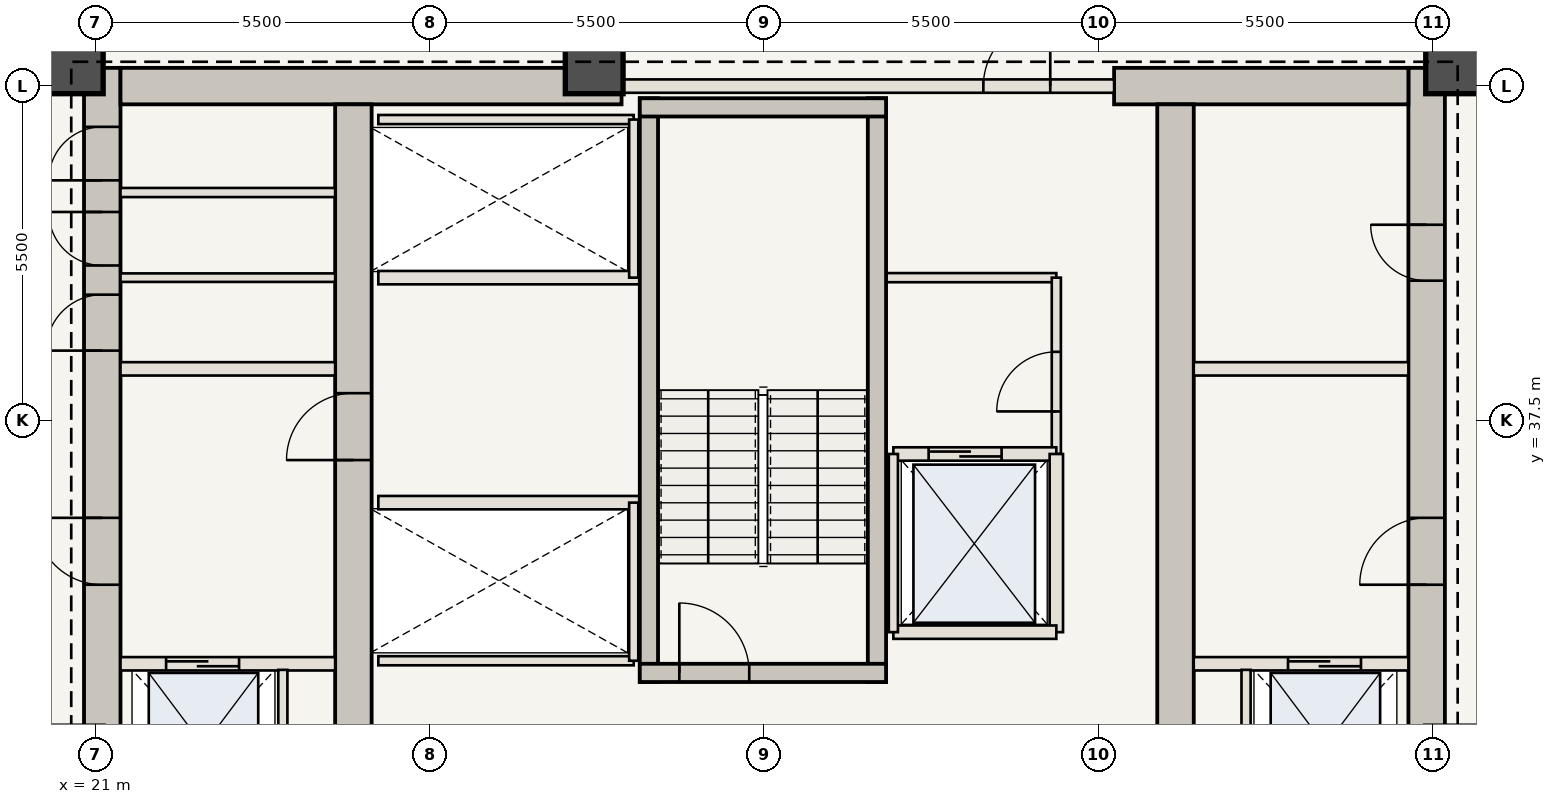
"""IFC4 building model, lengths in metres.
Left out: names, types, materials, properties, quantities, classifications, styles, units other than length and angle.
Written with IfcOpenShell. Run it as: python <this file> out.ifc"""

import sys

from ifc_helpers import new_model, si_unit, direction, frame, frame_2d, origin, origin_2d, place, context, subcontext, project, spatial, rectangle, extrude, element, fill, save


model = new_model("IFC4")
c1 = context("Model", 3, precision=1e-05, world=origin(), true_north=direction((0.0, 1.0)))
c2 = subcontext(c1, "Body", "Model", "MODEL_VIEW")
j1 = project(units=[si_unit("LENGTHUNIT", "METRE"), si_unit("PLANEANGLEUNIT", "RADIAN")], contexts=[c1])
p1 = place(None, origin())
s1 = spatial("IfcSite", under=j1, at=p1, CompositionType="ELEMENT")
p2 = place(p1, origin())
s2 = spatial("IfcBuilding", under=s1, at=p2, CompositionType="ELEMENT")
p3 = place(p2, frame((0.0, 0.0, 122.15)))
s3 = spatial("IfcBuildingStorey", under=s2, at=p3, CompositionType="ELEMENT", Elevation=122.15)
p4 = place(p3, frame((21.11, 30.6, 0.0), z_axis=(0.0, 0.0, 1.0), x_axis=(0.0, 1.0, 0.0)))
e1 = element("IfcWall", 1, at=p4, inside=s3, PredefinedType="SHEAR", context=c2, shape_type="SweptSolid", body=[
    extrude(rectangle(XDim=12.7, YDim=0.6, at=frame_2d((6.35, 0.0))), origin(), (0.0, 0.0, 1.0), 3.85),
])
p5 = place(p4, frame((4.2, 0.0, 0.0)))
e2 = element("IfcOpeningElement", 2, at=p5, cuts=e1, PredefinedType="OPENING", context=c2, shape_type="SweptSolid", body=[
    extrude(rectangle(XDim=1.1, YDim=2.15, at=frame_2d((0.55, 1.075))), frame((0.0, 0.31, 0.0), z_axis=(0.0, -1.0, 0.0), x_axis=(1.0, 0.0, 0.0)), (0.0, 0.0, 1.0), 0.62),
])
p6 = place(p4, frame((8.05, 0.0, 0.0)))
e3 = element("IfcOpeningElement", 3, at=p6, cuts=e1, PredefinedType="OPENING", context=c2, shape_type="SweptSolid", body=[
    extrude(rectangle(XDim=0.92, YDim=2.1, at=frame_2d((0.46, 1.05))), frame((0.0, 0.31, 0.0), z_axis=(0.0, -1.0, 0.0), x_axis=(1.0, 0.0, 0.0)), (0.0, 0.0, 1.0), 0.62),
])
p7 = place(p4, frame((9.45, 0.0, 0.0)))
e4 = element("IfcOpeningElement", 4, at=p7, cuts=e1, PredefinedType="OPENING", context=c2, shape_type="SweptSolid", body=[
    extrude(rectangle(XDim=0.88, YDim=2.1, at=frame_2d((0.44, 1.05))), frame((0.0, 0.31, 0.0), z_axis=(0.0, -1.0, 0.0), x_axis=(1.0, 0.0, 0.0)), (0.0, 0.0, 1.0), 0.62),
])
p8 = place(p4, frame((10.85, 0.0, 0.0)))
e5 = element("IfcOpeningElement", 5, at=p8, cuts=e1, PredefinedType="OPENING", context=c2, shape_type="SweptSolid", body=[
    extrude(rectangle(XDim=0.88, YDim=2.1, at=frame_2d((0.44, 1.05))), frame((0.0, 0.31, 0.0), z_axis=(0.0, -1.0, 0.0), x_axis=(1.0, 0.0, 0.0)), (0.0, 0.0, 1.0), 0.62),
])
p9 = place(p3, frame((42.89, 30.6, 0.0), z_axis=(0.0, 0.0, 1.0), x_axis=(0.0, 1.0, 0.0)))
e6 = element("IfcWall", 6, at=p9, inside=s3, PredefinedType="SHEAR", context=c2, shape_type="SweptSolid", body=[
    extrude(rectangle(XDim=12.7, YDim=0.6, at=frame_2d((6.35, 0.0))), origin(), (0.0, 0.0, 1.0), 3.85),
])
p10 = place(p9, frame((4.2, 0.0, 0.0)))
e7 = element("IfcOpeningElement", 7, at=p10, cuts=e6, PredefinedType="OPENING", context=c2, shape_type="SweptSolid", body=[
    extrude(rectangle(XDim=1.1, YDim=2.15, at=frame_2d((0.55, 1.075))), frame((0.0, 0.31, 0.0), z_axis=(0.0, -1.0, 0.0), x_axis=(1.0, 0.0, 0.0)), (0.0, 0.0, 1.0), 0.62),
])
p11 = place(p9, frame((9.2, 0.0, 0.0)))
e8 = element("IfcOpeningElement", 8, at=p11, cuts=e6, PredefinedType="OPENING", context=c2, shape_type="SweptSolid", body=[
    extrude(rectangle(XDim=0.92, YDim=2.1, at=frame_2d((0.46, 1.05))), frame((0.0, 0.31, 0.0), z_axis=(0.0, -1.0, 0.0), x_axis=(1.0, 0.0, 0.0)), (0.0, 0.0, 1.0), 0.62),
])
p12 = place(p3, frame((21.41, 43.0, 0.0), z_axis=(0.0, 0.0, 1.0), x_axis=(1.0, 0.0, 0.0)))
e9 = element("IfcWall", 9, at=p12, inside=s3, PredefinedType="SHEAR", context=c2, shape_type="SweptSolid", body=[
    extrude(rectangle(XDim=8.24, YDim=0.6, at=frame_2d((4.12, 0.0))), origin(), (0.0, 0.0, 1.0), 3.85),
])
p13 = place(p3, frame((37.75, 43.0, 0.0), z_axis=(0.0, 0.0, 1.0), x_axis=(1.0, 0.0, 0.0)))
e10 = element("IfcWall", 10, at=p13, inside=s3, PredefinedType="SHEAR", context=c2, shape_type="SweptSolid", body=[
    extrude(rectangle(XDim=4.84, YDim=0.6, at=frame_2d((2.42, 0.0))), origin(), (0.0, 0.0, 1.0), 3.85),
])
p14 = place(p3, frame((25.24, 30.6, 0.0), z_axis=(0.0, 0.0, 1.0), x_axis=(0.0, 1.0, 0.0)))
e11 = element("IfcWall", 11, at=p14, inside=s3, PredefinedType="SHEAR", context=c2, shape_type="SweptSolid", body=[
    extrude(rectangle(XDim=12.1, YDim=0.6, at=frame_2d((6.05, 0.0))), origin(), (0.0, 0.0, 1.0), 3.85),
])
p15 = place(p14, frame((6.25, 0.0, 0.0)))
e12 = element("IfcOpeningElement", 12, at=p15, cuts=e11, PredefinedType="OPENING", context=c2, shape_type="SweptSolid", body=[
    extrude(rectangle(XDim=1.1, YDim=2.15, at=frame_2d((0.55, 1.075))), frame((0.0, 0.31, 0.0), z_axis=(0.0, -1.0, 0.0), x_axis=(1.0, 0.0, 0.0)), (0.0, 0.0, 1.0), 0.62),
])
p16 = place(p3, frame((38.76, 30.6, 0.0), z_axis=(0.0, 0.0, 1.0), x_axis=(0.0, 1.0, 0.0)))
e13 = element("IfcWall", 13, at=p16, inside=s3, PredefinedType="SHEAR", context=c2, shape_type="SweptSolid", body=[
    extrude(rectangle(XDim=12.1, YDim=0.6, at=frame_2d((6.05, 0.0))), origin(), (0.0, 0.0, 1.0), 3.85),
])
for number, where, z_axis, x_axis in (
    (14, (43.35, 43.35, 0.0), (0.0, 0.0, 1.0), (1.0, 0.0, 0.0)),
    (15, (29.2, 43.35, 0.0), (0.0, 0.0, 1.0), (1.0, 0.0, 0.0)),
    (16, (20.65, 43.35, 0.0), (0.0, 0.0, 1.0), (1.0, 0.0, 0.0)),
):
    element("IfcColumn", number, at=place(p3, frame(where, z_axis=z_axis, x_axis=x_axis)), inside=s3, PredefinedType="COLUMN", context=c2, shape_type="SweptSolid", body=[
        extrude(rectangle(XDim=0.95, YDim=0.95, at=origin_2d()), origin(), (0.0, 0.0, 1.0), 3.85),
    ])
p17 = place(p3, frame((21.41, 33.5, 0.0), z_axis=(0.0, 0.0, 1.0), x_axis=(1.0, 0.0, 0.0)))
e17 = element("IfcWall", 17, at=p17, inside=s3, PredefinedType="STANDARD", context=c2, shape_type="SweptSolid", body=[
    extrude(rectangle(XDim=3.53, YDim=0.22, at=frame_2d((1.765, 0.0))), origin(), (0.0, 0.0, 1.0), 3.685),
])
p18 = place(p17, frame((0.75, 0.0, 0.0)))
e18 = element("IfcOpeningElement", 18, at=p18, cuts=e17, PredefinedType="OPENING", context=c2, shape_type="SweptSolid", body=[
    extrude(rectangle(XDim=1.2, YDim=2.2, at=frame_2d((0.6, 1.1))), frame((0.0, 0.12, 0.0), z_axis=(0.0, -1.0, 0.0), x_axis=(1.0, 0.0, 0.0)), (0.0, 0.0, 1.0), 0.24),
])
p19 = place(p3, frame((24.08, 30.75, 0.0), z_axis=(0.0, 0.0, 1.0), x_axis=(0.0, 1.0, 0.0)))
e19 = element("IfcWall", 19, at=p19, inside=s3, PredefinedType="STANDARD", context=c2, shape_type="SweptSolid", body=[
    extrude(rectangle(XDim=2.65, YDim=0.15, at=frame_2d((1.325, 0.0))), origin(), (0.0, 0.0, 1.0), 3.685),
])
p20 = place(p3, frame((39.06, 33.5, 0.0), z_axis=(0.0, 0.0, 1.0), x_axis=(1.0, 0.0, 0.0)))
e20 = element("IfcWall", 20, at=p20, inside=s3, PredefinedType="STANDARD", context=c2, shape_type="SweptSolid", body=[
    extrude(rectangle(XDim=3.53, YDim=0.22, at=frame_2d((1.765, 0.0))), origin(), (0.0, 0.0, 1.0), 3.685),
])
p21 = place(p20, frame((1.55, 0.0, 0.0)))
e21 = element("IfcOpeningElement", 21, at=p21, cuts=e20, PredefinedType="OPENING", context=c2, shape_type="SweptSolid", body=[
    extrude(rectangle(XDim=1.2, YDim=2.2, at=frame_2d((0.6, 1.1))), frame((0.0, 0.12, 0.0), z_axis=(0.0, -1.0, 0.0), x_axis=(1.0, 0.0, 0.0)), (0.0, 0.0, 1.0), 0.24),
])
p22 = place(p3, frame((39.92, 30.75, 0.0), z_axis=(0.0, 0.0, 1.0), x_axis=(0.0, 1.0, 0.0)))
e22 = element("IfcWall", 22, at=p22, inside=s3, PredefinedType="STANDARD", context=c2, shape_type="SweptSolid", body=[
    extrude(rectangle(XDim=2.65, YDim=0.15, at=frame_2d((1.325, 0.0))), origin(), (0.0, 0.0, 1.0), 3.685),
])
for number, where, z_axis, x_axis in (
    (23, (21.41, 38.35, 0.0), (0.0, 0.0, 1.0), (1.0, 0.0, 0.0)),
    (24, (39.06, 38.35, 0.0), (0.0, 0.0, 1.0), (1.0, 0.0, 0.0)),
):
    element("IfcWall", number, at=place(p3, frame(where, z_axis=z_axis, x_axis=x_axis)), inside=s3, PredefinedType="STANDARD", context=c2, shape_type="SweptSolid", body=[
        extrude(rectangle(XDim=3.53, YDim=0.22, at=frame_2d((1.765, 0.0))), origin(), (0.0, 0.0, 1.0), 3.685),
    ])
p23 = place(p3, frame((21.41, 39.85, 0.0), z_axis=(0.0, 0.0, 1.0), x_axis=(1.0, 0.0, 0.0)))
e25 = element("IfcWall", 25, at=p23, inside=s3, PredefinedType="STANDARD", context=c2, shape_type="SweptSolid", body=[
    extrude(rectangle(XDim=3.53, YDim=0.14, at=frame_2d((1.765, 0.0))), origin(), (0.0, 0.0, 1.0), 3.685),
])
p24 = place(p3, frame((21.41, 41.25, 0.0), z_axis=(0.0, 0.0, 1.0), x_axis=(1.0, 0.0, 0.0)))
e26 = element("IfcWall", 26, at=p24, inside=s3, PredefinedType="STANDARD", context=c2, shape_type="SweptSolid", body=[
    extrude(rectangle(XDim=3.53, YDim=0.15, at=frame_2d((1.765, 0.0))), origin(), (0.0, 0.0, 1.0), 3.685),
])
p25 = place(p3, frame((34.0, 39.85, 0.0), z_axis=(0.0, 0.0, 1.0), x_axis=(1.0, 0.0, 0.0)))
e27 = element("IfcWall", 27, at=p25, inside=s3, PredefinedType="STANDARD", context=c2, shape_type="SweptSolid", body=[
    extrude(rectangle(XDim=2.8, YDim=0.15, at=frame_2d((1.4, 0.0))), origin(), (0.0, 0.0, 1.0), 3.685),
])
p26 = place(p3, frame((36.8, 36.95, 0.0), z_axis=(0.0, 0.0, 1.0), x_axis=(0.0, 1.0, 0.0)))
e28 = element("IfcWall", 28, at=p26, inside=s3, PredefinedType="STANDARD", context=c2, shape_type="SweptSolid", body=[
    extrude(rectangle(XDim=2.9, YDim=0.15, at=frame_2d((1.45, 0.0))), origin(), (0.0, 0.0, 1.0), 3.685),
])
p27 = place(p26, frame((0.7, 0.0, 0.0)))
e29 = element("IfcOpeningElement", 29, at=p27, cuts=e28, PredefinedType="OPENING", context=c2, shape_type="SweptSolid", body=[
    extrude(rectangle(XDim=0.98, YDim=2.2, at=frame_2d((0.49, 1.1))), frame((0.0, 0.085, 0.0), z_axis=(0.0, -1.0, 0.0), x_axis=(1.0, 0.0, 0.0)), (0.0, 0.0, 1.0), 0.17),
])
p28 = place(p3, frame((25.65, 36.15, 0.0), z_axis=(0.0, 0.0, 1.0), x_axis=(1.0, 0.0, 0.0)))
e30 = element("IfcWall", 30, at=p28, inside=s3, PredefinedType="STANDARD", context=c2, shape_type="SweptSolid", body=[
    extrude(rectangle(XDim=4.3, YDim=0.22, at=frame_2d((2.15, 0.0))), origin(), (0.0, 0.0, 1.0), 3.685),
])
p29 = place(p3, frame((25.65, 33.55, 0.0), z_axis=(0.0, 0.0, 1.0), x_axis=(1.0, 0.0, 0.0)))
e31 = element("IfcWall", 31, at=p29, inside=s3, PredefinedType="STANDARD", context=c2, shape_type="SweptSolid", body=[
    extrude(rectangle(XDim=4.2, YDim=0.15, at=frame_2d((2.1, 0.0))), origin(), (0.0, 0.0, 1.0), 3.685),
])
p30 = place(p3, frame((29.85, 33.55, 0.0), z_axis=(0.0, 0.0, 1.0), x_axis=(0.0, 1.0, 0.0)))
e32 = element("IfcWall", 32, at=p30, inside=s3, PredefinedType="STANDARD", context=c2, shape_type="SweptSolid", body=[
    extrude(rectangle(XDim=2.6, YDim=0.15, at=frame_2d((1.3, 0.0))), origin(), (0.0, 0.0, 1.0), 3.685),
])
p31 = place(p3, frame((25.65, 39.85, 0.0), z_axis=(0.0, 0.0, 1.0), x_axis=(1.0, 0.0, 0.0)))
e33 = element("IfcWall", 33, at=p31, inside=s3, PredefinedType="STANDARD", context=c2, shape_type="SweptSolid", body=[
    extrude(rectangle(XDim=4.3, YDim=0.22, at=frame_2d((2.15, 0.0))), origin(), (0.0, 0.0, 1.0), 3.685),
])
p32 = place(p3, frame((25.65, 42.45, 0.0), z_axis=(0.0, 0.0, 1.0), x_axis=(1.0, 0.0, 0.0)))
e34 = element("IfcWall", 34, at=p32, inside=s3, PredefinedType="STANDARD", context=c2, shape_type="SweptSolid", body=[
    extrude(rectangle(XDim=4.2, YDim=0.15, at=frame_2d((2.1, 0.0))), origin(), (0.0, 0.0, 1.0), 3.685),
])
p33 = place(p3, frame((29.85, 39.85, 0.0), z_axis=(0.0, 0.0, 1.0), x_axis=(0.0, 1.0, 0.0)))
e35 = element("IfcWall", 35, at=p33, inside=s3, PredefinedType="STANDARD", context=c2, shape_type="SweptSolid", body=[
    extrude(rectangle(XDim=2.6, YDim=0.15, at=frame_2d((1.3, 0.0))), origin(), (0.0, 0.0, 1.0), 3.685),
])
for number, where, z_axis, x_axis in (
    (36, (30.1, 33.2, 0.0), (0.0, 0.0, 1.0), (0.0, 1.0, 0.0)),
    (37, (33.85, 33.2, 0.0), (0.0, 0.0, 1.0), (0.0, 1.0, 0.0)),
):
    element("IfcWall", number, at=place(p3, frame(where, z_axis=z_axis, x_axis=x_axis)), inside=s3, PredefinedType="SHEAR", context=c2, shape_type="SweptSolid", body=[
        extrude(rectangle(XDim=9.6, YDim=0.3, at=frame_2d((4.8, 0.0))), origin(), (0.0, 0.0, 1.0), 3.685),
    ])
p34 = place(p3, frame((29.95, 33.35, 0.0), z_axis=(0.0, 0.0, 1.0), x_axis=(1.0, 0.0, 0.0)))
e38 = element("IfcWall", 38, at=p34, inside=s3, PredefinedType="SHEAR", context=c2, shape_type="SweptSolid", body=[
    extrude(rectangle(XDim=4.05, YDim=0.3, at=frame_2d((2.025, 0.0))), origin(), (0.0, 0.0, 1.0), 3.685),
])
p35 = place(p34, frame((0.65, 0.0, 0.0)))
e39 = element("IfcOpeningElement", 39, at=p35, cuts=e38, PredefinedType="OPENING", context=c2, shape_type="SweptSolid", body=[
    extrude(rectangle(XDim=1.15, YDim=2.15, at=frame_2d((0.575, 1.075))), frame((0.0, 0.16, 0.0), z_axis=(0.0, -1.0, 0.0), x_axis=(1.0, 0.0, 0.0)), (0.0, 0.0, 1.0), 0.32),
])
p36 = place(p3, frame((29.95, 42.65, 0.0), z_axis=(0.0, 0.0, 1.0), x_axis=(1.0, 0.0, 0.0)))
e40 = element("IfcWall", 40, at=p36, inside=s3, PredefinedType="SHEAR", context=c2, shape_type="SweptSolid", body=[
    extrude(rectangle(XDim=4.05, YDim=0.3, at=frame_2d((2.025, 0.0))), origin(), (0.0, 0.0, 1.0), 3.685),
])
p37 = place(p3, frame((29.65, 43.0, 0.0), z_axis=(0.0, 0.0, 1.0), x_axis=(1.0, 0.0, 0.0)))
e41 = element("IfcWall", 41, at=p37, inside=s3, PredefinedType="STANDARD", context=c2, shape_type="SweptSolid", body=[
    extrude(rectangle(XDim=8.1, YDim=0.22, at=frame_2d((4.05, 0.0))), origin(), (0.0, 0.0, 1.0), 3.685),
])
p38 = place(p37, frame((5.95, 0.0, 0.0)))
e42 = element("IfcOpeningElement", 42, at=p38, cuts=e41, PredefinedType="OPENING", context=c2, shape_type="SweptSolid", body=[
    extrude(rectangle(XDim=1.1, YDim=2.15, at=frame_2d((0.55, 1.075))), frame((0.0, 0.12, 0.0), z_axis=(0.0, -1.0, 0.0), x_axis=(1.0, 0.0, 0.0)), (0.0, 0.0, 1.0), 0.24),
])
p39 = place(p3, frame((34.12, 36.95, 0.0), z_axis=(0.0, 0.0, 1.0), x_axis=(1.0, 0.0, 0.0)))
e43 = element("IfcWall", 43, at=p39, inside=s3, PredefinedType="STANDARD", context=c2, shape_type="SweptSolid", body=[
    extrude(rectangle(XDim=2.68, YDim=0.22, at=frame_2d((1.34, 0.0))), origin(), (0.0, 0.0, 1.0), 3.685),
])
p40 = place(p39, frame((0.58, 0.0, 0.0)))
e44 = element("IfcOpeningElement", 44, at=p40, cuts=e43, PredefinedType="OPENING", context=c2, shape_type="SweptSolid", body=[
    extrude(rectangle(XDim=1.2, YDim=2.2, at=frame_2d((0.6, 1.1))), frame((0.0, 0.12, 0.0), z_axis=(0.0, -1.0, 0.0), x_axis=(1.0, 0.0, 0.0)), (0.0, 0.0, 1.0), 0.24),
])
p41 = place(p3, frame((36.8, 34.02, 0.0), z_axis=(0.0, 0.0, 1.0), x_axis=(0.0, 1.0, 0.0)))
e45 = element("IfcWall", 45, at=p41, inside=s3, PredefinedType="STANDARD", context=c2, shape_type="SweptSolid", body=[
    extrude(rectangle(XDim=2.93, YDim=0.22, at=frame_2d((1.465, 0.0))), origin(), (0.0, 0.0, 1.0), 3.685),
])
p42 = place(p3, frame((34.12, 34.02, 0.0), z_axis=(0.0, 0.0, 1.0), x_axis=(1.0, 0.0, 0.0)))
e46 = element("IfcWall", 46, at=p42, inside=s3, PredefinedType="STANDARD", context=c2, shape_type="SweptSolid", body=[
    extrude(rectangle(XDim=2.68, YDim=0.22, at=frame_2d((1.34, 0.0))), origin(), (0.0, 0.0, 1.0), 3.685),
])
p43 = place(p3, frame((34.12, 34.02, 0.0), z_axis=(0.0, 0.0, 1.0), x_axis=(0.0, 1.0, 0.0)))
e47 = element("IfcWall", 47, at=p43, inside=s3, PredefinedType="STANDARD", context=c2, shape_type="SweptSolid", body=[
    extrude(rectangle(XDim=2.93, YDim=0.15, at=frame_2d((1.465, 0.0))), origin(), (0.0, 0.0, 1.0), 3.685),
])
p44 = place(p5, origin())
e48 = element("IfcDoor", 48, at=p44, inside=s3, OperationType="SINGLE_SWING_RIGHT", PredefinedType="DOOR", context=c2, shape_type="SweptSolid", body=[
    extrude(rectangle(XDim=1.1, YDim=2.15, at=frame_2d((0.55, 1.075))), frame((0.0, 0.025, 0.0), z_axis=(0.0, -1.0, 0.0), x_axis=(1.0, 0.0, 0.0)), (0.0, 0.0, 1.0), 0.05),
])
fill(e2, e48)
p45 = place(p10, origin())
e49 = element("IfcDoor", 49, at=p45, inside=s3, OperationType="SINGLE_SWING_LEFT", PredefinedType="DOOR", context=c2, shape_type="SweptSolid", body=[
    extrude(rectangle(XDim=1.1, YDim=2.15, at=frame_2d((0.55, 1.075))), frame((0.0, 0.025, 0.0), z_axis=(0.0, -1.0, 0.0), x_axis=(1.0, 0.0, 0.0)), (0.0, 0.0, 1.0), 0.05),
])
fill(e7, e49)
p46 = place(p15, origin())
e50 = element("IfcDoor", 50, at=p46, inside=s3, OperationType="SINGLE_SWING_LEFT", PredefinedType="DOOR", context=c2, shape_type="SweptSolid", body=[
    extrude(rectangle(XDim=1.1, YDim=2.15, at=frame_2d((0.55, 1.075))), frame((0.0, 0.025, 0.0), z_axis=(0.0, -1.0, 0.0), x_axis=(1.0, 0.0, 0.0)), (0.0, 0.0, 1.0), 0.05),
])
fill(e12, e50)
p47 = place(p6, origin())
e51 = element("IfcDoor", 51, at=p47, inside=s3, OperationType="SINGLE_SWING_LEFT", PredefinedType="DOOR", context=c2, shape_type="SweptSolid", body=[
    extrude(rectangle(XDim=0.92, YDim=2.1, at=frame_2d((0.46, 1.05))), frame((0.0, 0.025, 0.0), z_axis=(0.0, -1.0, 0.0), x_axis=(1.0, 0.0, 0.0)), (0.0, 0.0, 1.0), 0.05),
])
fill(e3, e51)
p48 = place(p7, origin())
e52 = element("IfcDoor", 52, at=p48, inside=s3, OperationType="SINGLE_SWING_RIGHT", PredefinedType="DOOR", context=c2, shape_type="SweptSolid", body=[
    extrude(rectangle(XDim=0.88, YDim=2.1, at=frame_2d((0.44, 1.05))), frame((0.0, 0.025, 0.0), z_axis=(0.0, -1.0, 0.0), x_axis=(1.0, 0.0, 0.0)), (0.0, 0.0, 1.0), 0.05),
])
fill(e4, e52)
p49 = place(p8, origin())
e53 = element("IfcDoor", 53, at=p49, inside=s3, OperationType="SINGLE_SWING_LEFT", PredefinedType="DOOR", context=c2, shape_type="SweptSolid", body=[
    extrude(rectangle(XDim=0.88, YDim=2.1, at=frame_2d((0.44, 1.05))), frame((0.0, 0.025, 0.0), z_axis=(0.0, -1.0, 0.0), x_axis=(1.0, 0.0, 0.0)), (0.0, 0.0, 1.0), 0.05),
])
fill(e5, e53)
p50 = place(p11, origin())
e54 = element("IfcDoor", 54, at=p50, inside=s3, OperationType="SINGLE_SWING_RIGHT", PredefinedType="DOOR", context=c2, shape_type="SweptSolid", body=[
    extrude(rectangle(XDim=0.92, YDim=2.1, at=frame_2d((0.46, 1.05))), frame((0.0, 0.025, 0.0), z_axis=(0.0, -1.0, 0.0), x_axis=(1.0, 0.0, 0.0)), (0.0, 0.0, 1.0), 0.05),
])
fill(e8, e54)
p51 = place(p18, origin())
e55 = element("IfcDoor", 55, at=p51, inside=s3, OperationType="DOUBLE_DOOR_SLIDING", PredefinedType="DOOR", context=c2, shape_type="SweptSolid", body=[
    extrude(rectangle(XDim=1.2, YDim=2.2, at=frame_2d((0.6, 1.1))), frame((0.0, 0.025, 0.0), z_axis=(0.0, -1.0, 0.0), x_axis=(1.0, 0.0, 0.0)), (0.0, 0.0, 1.0), 0.05),
])
fill(e18, e55)
p52 = place(p21, origin())
e56 = element("IfcDoor", 56, at=p52, inside=s3, OperationType="DOUBLE_DOOR_SLIDING", PredefinedType="DOOR", context=c2, shape_type="SweptSolid", body=[
    extrude(rectangle(XDim=1.2, YDim=2.2, at=frame_2d((0.6, 1.1))), frame((0.0, 0.025, 0.0), z_axis=(0.0, -1.0, 0.0), x_axis=(1.0, 0.0, 0.0)), (0.0, 0.0, 1.0), 0.05),
])
fill(e21, e56)
p53 = place(p27, origin())
e57 = element("IfcDoor", 57, at=p53, inside=s3, OperationType="SINGLE_SWING_LEFT", PredefinedType="DOOR", context=c2, shape_type="SweptSolid", body=[
    extrude(rectangle(XDim=0.98, YDim=2.2, at=frame_2d((0.49, 1.1))), frame((0.0, 0.025, 0.0), z_axis=(0.0, -1.0, 0.0), x_axis=(1.0, 0.0, 0.0)), (0.0, 0.0, 1.0), 0.05),
])
fill(e29, e57)
p54 = place(p35, origin())
e58 = element("IfcDoor", 58, at=p54, inside=s3, OperationType="SINGLE_SWING_LEFT", PredefinedType="DOOR", context=c2, shape_type="SweptSolid", body=[
    extrude(rectangle(XDim=1.15, YDim=2.15, at=frame_2d((0.575, 1.075))), frame((0.0, 0.025, 0.0), z_axis=(0.0, -1.0, 0.0), x_axis=(1.0, 0.0, 0.0)), (0.0, 0.0, 1.0), 0.05),
])
fill(e39, e58)
p55 = place(p38, origin())
e59 = element("IfcDoor", 59, at=p55, inside=s3, OperationType="SINGLE_SWING_RIGHT", PredefinedType="DOOR", context=c2, shape_type="SweptSolid", body=[
    extrude(rectangle(XDim=1.1, YDim=2.15, at=frame_2d((0.55, 1.075))), frame((0.0, 0.025, 0.0), z_axis=(0.0, -1.0, 0.0), x_axis=(1.0, 0.0, 0.0)), (0.0, 0.0, 1.0), 0.05),
])
fill(e42, e59)
p56 = place(p40, origin())
e60 = element("IfcDoor", 60, at=p56, inside=s3, OperationType="DOUBLE_DOOR_SLIDING", PredefinedType="DOOR", context=c2, shape_type="SweptSolid", body=[
    extrude(rectangle(XDim=1.2, YDim=2.2, at=frame_2d((0.6, 1.1))), frame((0.0, 0.025, 0.0), z_axis=(0.0, -1.0, 0.0), x_axis=(1.0, 0.0, 0.0)), (0.0, 0.0, 1.0), 0.05),
])
fill(e44, e60)
save(model, sys.argv[1])
